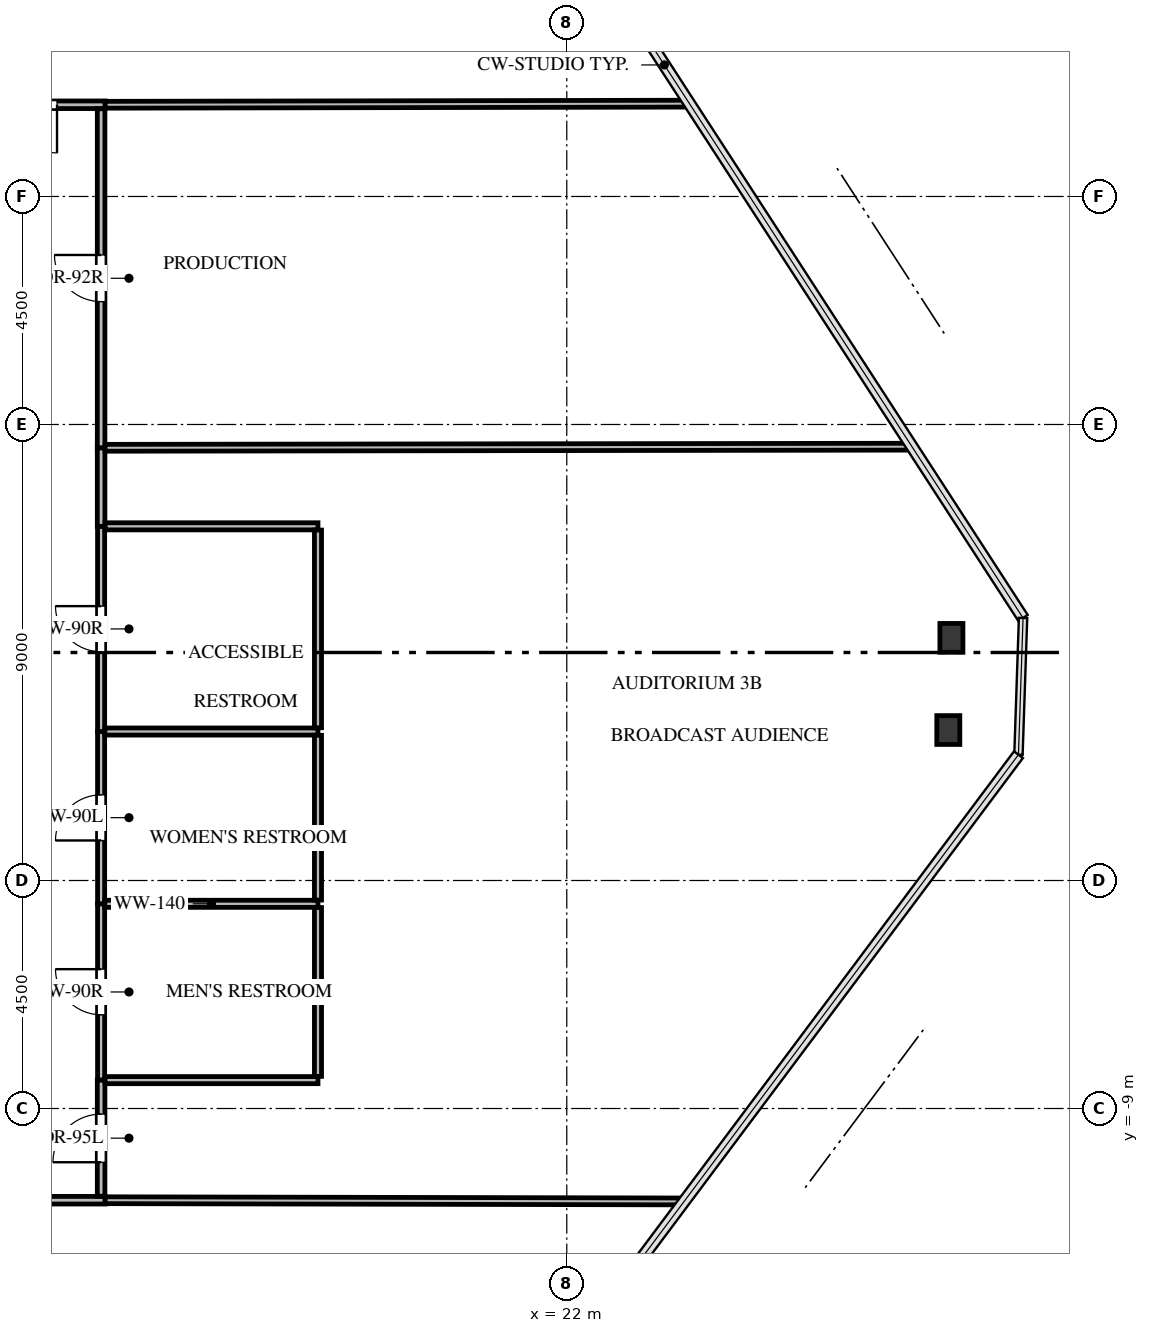
"""IFC4 building model, lengths in metres.
Left out: names, types, materials, properties, quantities, classifications, styles, units other than length and angle.
Written with IfcOpenShell. Run it as: python <this file> out.ifc"""

import sys

from ifc_helpers import new_model, si_unit, direction, frame, frame_2d, origin, origin_2d, place, context, subcontext, project, spatial, rectangle, i_section, extrude, source, transform, mapped, element, fill, save


model = new_model("IFC4")
c1 = context("Model", 3, precision=1e-05, world=origin(), true_north=direction((0.0, 1.0)))
c2 = subcontext(c1, "Body", "Model", "MODEL_VIEW")
j1 = project(units=[si_unit("LENGTHUNIT", "METRE"), si_unit("PLANEANGLEUNIT", "RADIAN")], contexts=[c1])
p1 = place(None, origin())
s1 = spatial("IfcSite", under=j1, at=p1, CompositionType="ELEMENT")
p2 = place(p1, origin())
s2 = spatial("IfcBuilding", under=s1, at=p2, CompositionType="ELEMENT")
p3 = place(p2, frame((0.0, 0.0, 15.6)))
s3 = spatial("IfcBuildingStorey", under=s2, at=p3, CompositionType="ELEMENT", Elevation=15.6)
m1 = source(origin(), c2, "Body", "SweptSolid", [
    extrude(i_section(OverallWidth=0.454, OverallDepth=0.569, WebThickness=0.078, FlangeThickness=0.125, FilletRadius=0.031, at=origin_2d()), origin(), (0.0, 0.0, 1.0), 5.6),
])
for number, where, z_axis, x_axis in (
    (1, (29.591, 0.289, -0.32), (0.0, 0.0, 1.0), (1.0, 0.0, 0.0)),
    (2, (29.529, -1.531, -0.32), (0.0, 0.0, 1.0), (1.0, 0.0, 0.0)),
):
    element("IfcColumn", number, at=place(p3, frame(where, z_axis=z_axis, x_axis=x_axis)), inside=s3, PredefinedType="COLUMN", context=c2, shape_type="MappedRepresentation", body=[
        mapped(m1, transform((0.0, 0.0, 0.0), x_axis=(1.0, 0.0, 0.0), y_axis=(0.0, 1.0, 0.0), z_axis=(0.0, 0.0, 1.0), scale=1.0)),
    ])
p4 = place(p3, frame((12.81, -8.44, 0.0), z_axis=(0.0, 0.0, 1.0), x_axis=(0.0, 1.0, 0.0)))
e3 = element("IfcWall", 3, at=p4, inside=s3, PredefinedType="PARTITIONING", context=c2, shape_type="SweptSolid", body=[
    extrude(rectangle(XDim=3.48, YDim=0.14, at=frame_2d((1.74, 0.0))), origin(), (0.0, 0.0, 1.0), 5.265),
])
p5 = place(p4, frame((1.29, 0.0, 0.0)))
e4 = element("IfcOpeningElement", 4, at=p5, cuts=e3, PredefinedType="OPENING", context=c2, shape_type="SweptSolid", body=[
    extrude(rectangle(XDim=0.9, YDim=2.05, at=frame_2d((0.45, 1.025))), frame((0.0, 0.08, 0.0), z_axis=(0.0, -1.0, 0.0), x_axis=(1.0, 0.0, 0.0)), (0.0, 0.0, 1.0), 0.16),
])
p6 = place(p3, frame((12.81, -4.96, 0.0), z_axis=(0.0, 0.0, 1.0), x_axis=(0.0, 1.0, 0.0)))
e5 = element("IfcWall", 5, at=p6, inside=s3, PredefinedType="PARTITIONING", context=c2, shape_type="SweptSolid", body=[
    extrude(rectangle(XDim=3.4, YDim=0.14, at=frame_2d((1.7, 0.0))), origin(), (0.0, 0.0, 1.0), 4.284),
])
p7 = place(p6, frame((1.25, 0.0, 0.0)))
e6 = element("IfcOpeningElement", 6, at=p7, cuts=e5, PredefinedType="OPENING", context=c2, shape_type="SweptSolid", body=[
    extrude(rectangle(XDim=0.9, YDim=2.05, at=frame_2d((0.45, 1.025))), frame((0.0, 0.08, 0.0), z_axis=(0.0, -1.0, 0.0), x_axis=(1.0, 0.0, 0.0)), (0.0, 0.0, 1.0), 0.16),
])
p8 = place(p3, frame((12.81, -1.56, 0.0), z_axis=(0.0, 0.0, 1.0), x_axis=(0.0, 1.0, 0.0)))
e7 = element("IfcWall", 7, at=p8, inside=s3, PredefinedType="PARTITIONING", context=c2, shape_type="SweptSolid", body=[
    extrude(rectangle(XDim=4.05, YDim=0.14, at=frame_2d((2.025, 0.0))), origin(), (0.0, 0.0, 1.0), 4.284),
])
p9 = place(p8, frame((1.575, 0.0, 0.0)))
e8 = element("IfcOpeningElement", 8, at=p9, cuts=e7, PredefinedType="OPENING", context=c2, shape_type="SweptSolid", body=[
    extrude(rectangle(XDim=0.9, YDim=2.05, at=frame_2d((0.45, 1.025))), frame((0.0, 0.08, 0.0), z_axis=(0.0, -1.0, 0.0), x_axis=(1.0, 0.0, 0.0)), (0.0, 0.0, 1.0), 0.16),
])
p10 = place(p3, frame((12.89, 10.81, 0.0), z_axis=(0.0, 0.0, 1.0), x_axis=(-1.0, 0.0, 0.0)))
e9 = element("IfcWall", 9, at=p10, inside=s3, PredefinedType="PARTITIONING", context=c2, shape_type="SweptSolid", body=[
    extrude(rectangle(XDim=2.85, YDim=0.15, at=frame_2d((1.425, 0.0))), origin(), (0.0, 0.0, 1.0), 4.284),
])
p11 = place(p10, frame((0.95, 0.0, 0.0)))
e10 = element("IfcOpeningElement", 10, at=p11, cuts=e9, PredefinedType="OPENING", context=c2, shape_type="SweptSolid", body=[
    extrude(rectangle(XDim=0.95, YDim=2.1, at=frame_2d((0.475, 1.05))), frame((0.0, 0.085, 0.0), z_axis=(0.0, -1.0, 0.0), x_axis=(1.0, 0.0, 0.0)), (0.0, 0.0, 1.0), 0.17),
])
p12 = place(p3, frame((6.04, -10.81, 0.0), z_axis=(0.0, 0.0, 1.0), x_axis=(1.0, 0.0, 0.0)))
e11 = element("IfcWall", 11, at=p12, inside=s3, PredefinedType="PARTITIONING", context=c2, shape_type="SweptSolid", body=[
    extrude(rectangle(XDim=6.85, YDim=0.15, at=frame_2d((3.425, 0.0))), origin(), (0.0, 0.0, 1.0), 5.265),
])
p13 = place(p12, frame((0.35, 0.0, 0.0)))
e12 = element("IfcOpeningElement", 12, at=p13, cuts=e11, PredefinedType="OPENING", context=c2, shape_type="SweptSolid", body=[
    extrude(rectangle(XDim=0.92, YDim=2.1, at=frame_2d((0.46, 1.05))), frame((0.0, 0.085, 0.0), z_axis=(0.0, -1.0, 0.0), x_axis=(1.0, 0.0, 0.0)), (0.0, 0.0, 1.0), 0.17),
])
p14 = place(p3, frame((12.81, -10.731, 0.0), z_axis=(0.0, 0.0, 1.0), x_axis=(0.0, 1.0, 0.0)))
e13 = element("IfcWall", 13, at=p14, inside=s3, PredefinedType="PARTITIONING", context=c2, shape_type="SweptSolid", body=[
    extrude(rectangle(XDim=2.291, YDim=0.15, at=frame_2d((1.146, 0.0))), origin(), (0.0, 0.0, 1.0), 5.265),
])
p15 = place(p14, frame((0.67, 0.0, 0.0)))
e14 = element("IfcOpeningElement", 14, at=p15, cuts=e13, PredefinedType="OPENING", context=c2, shape_type="SweptSolid", body=[
    extrude(rectangle(XDim=0.95, YDim=2.1, at=frame_2d((0.475, 1.05))), frame((0.0, 0.085, 0.0), z_axis=(0.0, -1.0, 0.0), x_axis=(1.0, 0.0, 0.0)), (0.0, 0.0, 1.0), 0.17),
])
p16 = place(p3, frame((12.81, 2.49, 0.0), z_axis=(0.0, 0.0, 1.0), x_axis=(0.0, 1.0, 0.0)))
e15 = element("IfcWall", 15, at=p16, inside=s3, PredefinedType="PARTITIONING", context=c2, shape_type="SweptSolid", body=[
    extrude(rectangle(XDim=1.55, YDim=0.15, at=frame_2d((0.775, 0.0))), origin(), (0.0, 0.0, 1.0), 5.265),
])
p17 = place(p3, frame((12.81, 4.04, 0.0), z_axis=(0.0, 0.0, 1.0), x_axis=(0.0, 1.0, 0.0)))
e16 = element("IfcWall", 16, at=p17, inside=s3, PredefinedType="PARTITIONING", context=c2, shape_type="SweptSolid", body=[
    extrude(rectangle(XDim=6.691, YDim=0.15, at=frame_2d((3.345, 0.0))), origin(), (0.0, 0.0, 1.0), 5.265),
])
p18 = place(p17, frame((2.885, 0.0, 0.0)))
e17 = element("IfcOpeningElement", 17, at=p18, cuts=e16, PredefinedType="OPENING", context=c2, shape_type="SweptSolid", body=[
    extrude(rectangle(XDim=0.92, YDim=2.1, at=frame_2d((0.46, 1.05))), frame((0.0, 0.085, 0.0), z_axis=(0.0, -1.0, 0.0), x_axis=(1.0, 0.0, 0.0)), (0.0, 0.0, 1.0), 0.17),
])
p19 = place(p3, frame((12.884, -4.96, 0.0), z_axis=(0.0, 0.0, 1.0), x_axis=(1.0, 0.0, 0.0)))
e18 = element("IfcWall", 18, at=p19, inside=s3, PredefinedType="PARTITIONING", context=c2, shape_type="SweptSolid", body=[
    extrude(rectangle(XDim=4.206, YDim=0.14, at=frame_2d((2.103, 0.0))), origin(), (0.0, 0.0, 1.0), 5.265),
])
p20 = place(p3, frame((17.09, -8.44, 0.0), z_axis=(0.0, 0.0, 1.0), x_axis=(-1.0, 0.0, 0.0)))
e19 = element("IfcWall", 19, at=p20, inside=s3, PredefinedType="PARTITIONING", context=c2, shape_type="SweptSolid", body=[
    extrude(rectangle(XDim=4.201, YDim=0.14, at=frame_2d((2.101, 0.0))), origin(), (0.0, 0.0, 1.0), 5.265),
])
p21 = place(p3, frame((17.09, -5.034, 0.0), z_axis=(0.0, 0.0, 1.0), x_axis=(0.0, -1.0, 0.0)))
e20 = element("IfcWall", 20, at=p21, inside=s3, PredefinedType="PARTITIONING", context=c2, shape_type="SweptSolid", body=[
    extrude(rectangle(XDim=3.332, YDim=0.14, at=frame_2d((1.666, 0.0))), origin(), (0.0, 0.0, 1.0), 5.265),
])
p22 = place(p3, frame((12.884, -1.56, 0.0), z_axis=(0.0, 0.0, 1.0), x_axis=(1.0, 0.0, 0.0)))
e21 = element("IfcWall", 21, at=p22, inside=s3, PredefinedType="PARTITIONING", context=c2, shape_type="SweptSolid", body=[
    extrude(rectangle(XDim=4.206, YDim=0.14, at=frame_2d((2.103, 0.0))), origin(), (0.0, 0.0, 1.0), 5.265),
])
p23 = place(p3, frame((17.09, -1.634, 0.0), z_axis=(0.0, 0.0, 1.0), x_axis=(0.0, -1.0, 0.0)))
e22 = element("IfcWall", 22, at=p23, inside=s3, PredefinedType="PARTITIONING", context=c2, shape_type="SweptSolid", body=[
    extrude(rectangle(XDim=3.252, YDim=0.14, at=frame_2d((1.626, 0.0))), origin(), (0.0, 0.0, 1.0), 4.284),
])
p24 = place(p3, frame((12.889, 2.49, 0.0), z_axis=(0.0, 0.0, 1.0), x_axis=(1.0, 0.0, 0.0)))
e23 = element("IfcWall", 23, at=p24, inside=s3, PredefinedType="PARTITIONING", context=c2, shape_type="SweptSolid", body=[
    extrude(rectangle(XDim=4.201, YDim=0.14, at=frame_2d((2.101, 0.0))), origin(), (0.0, 0.0, 1.0), 5.265),
])
p25 = place(p3, frame((17.09, 2.416, 0.0), z_axis=(0.0, 0.0, 1.0), x_axis=(0.0, -1.0, 0.0)))
e24 = element("IfcWall", 24, at=p25, inside=s3, PredefinedType="PARTITIONING", context=c2, shape_type="SweptSolid", body=[
    extrude(rectangle(XDim=3.902, YDim=0.14, at=frame_2d((1.951, 0.0))), origin(), (0.0, 0.0, 1.0), 4.284),
])
p26 = place(p3, frame((24.422, 10.832, 0.0), z_axis=(0.0, 0.0, 1.0), x_axis=(-0.999998264499, -0.001863061508, 0.0)))
e25 = element("IfcWall", 25, at=p26, inside=s3, PredefinedType="PARTITIONING", context=c2, shape_type="SweptSolid", body=[
    extrude(rectangle(XDim=11.532, YDim=0.135, at=frame_2d((5.766, 0.0))), origin(), (0.0, 0.0, 1.0), 4.574),
])
p27 = place(p3, frame((12.89, -10.81, 0.0), z_axis=(0.0, 0.0, 1.0), x_axis=(0.999997852069, -0.002072645121, 0.0)))
e26 = element("IfcWall", 26, at=p27, inside=s3, PredefinedType="PARTITIONING", context=c2, shape_type="SweptSolid", body=[
    extrude(rectangle(XDim=11.426, YDim=0.135, at=frame_2d((5.713, 0.0))), origin(), (0.0, 0.0, 1.0), 4.574),
])
p28 = place(p3, frame((12.889, 4.04, 0.0), z_axis=(0.0, 0.0, 1.0), x_axis=(0.999999068975, 0.001364568967, 0.0)))
e27 = element("IfcWall", 27, at=p28, inside=s3, PredefinedType="PARTITIONING", context=c2, shape_type="SweptSolid", body=[
    extrude(rectangle(XDim=15.923, YDim=0.135, at=frame_2d((7.962, 0.0))), origin(), (0.0, 0.0, 1.0), 4.574),
])
m2 = source(origin(), c2, "Body", "SweptSolid", [
    extrude(rectangle(XDim=0.9, YDim=2.05, at=frame_2d((0.45, 1.025))), frame((0.0, 0.025, 0.0), z_axis=(0.0, -1.0, 0.0), x_axis=(1.0, 0.0, 0.0)), (0.0, 0.0, 1.0), 0.05),
])
p29 = place(p5, origin())
e28 = element("IfcDoor", 28, at=p29, inside=s3, OperationType="SINGLE_SWING_RIGHT", PredefinedType="DOOR", context=c2, shape_type="MappedRepresentation", body=[
    mapped(m2, transform((0.0, 0.0, 0.0), x_axis=(1.0, 0.0, 0.0), y_axis=(0.0, 1.0, 0.0), z_axis=(0.0, 0.0, 1.0), scale=1.0)),
])
fill(e4, e28)
m3 = source(origin(), c2, "Body", "SweptSolid", [
    extrude(rectangle(XDim=0.9, YDim=2.05, at=frame_2d((0.45, 1.025))), frame((0.0, 0.025, 0.0), z_axis=(0.0, -1.0, 0.0), x_axis=(1.0, 0.0, 0.0)), (0.0, 0.0, 1.0), 0.05),
])
p30 = place(p7, origin())
e29 = element("IfcDoor", 29, at=p30, inside=s3, OperationType="SINGLE_SWING_LEFT", PredefinedType="DOOR", context=c2, shape_type="MappedRepresentation", body=[
    mapped(m3, transform((0.0, 0.0, 0.0), x_axis=(1.0, 0.0, 0.0), y_axis=(0.0, 1.0, 0.0), z_axis=(0.0, 0.0, 1.0), scale=1.0)),
])
fill(e6, e29)
p31 = place(p9, origin())
e30 = element("IfcDoor", 30, at=p31, inside=s3, OperationType="SINGLE_SWING_RIGHT", PredefinedType="DOOR", context=c2, shape_type="MappedRepresentation", body=[
    mapped(m2, transform((0.0, 0.0, 0.0), x_axis=(1.0, 0.0, 0.0), y_axis=(0.0, 1.0, 0.0), z_axis=(0.0, 0.0, 1.0), scale=1.0)),
])
fill(e8, e30)
m4 = source(origin(), c2, "Body", "SweptSolid", [
    extrude(rectangle(XDim=0.95, YDim=2.1, at=frame_2d((0.475, 1.05))), frame((0.0, 0.025, 0.0), z_axis=(0.0, -1.0, 0.0), x_axis=(1.0, 0.0, 0.0)), (0.0, 0.0, 1.0), 0.05),
])
p32 = place(p11, origin())
e31 = element("IfcDoor", 31, at=p32, inside=s3, OperationType="SINGLE_SWING_LEFT", PredefinedType="DOOR", context=c2, shape_type="MappedRepresentation", body=[
    mapped(m4, transform((0.0, 0.0, 0.0), x_axis=(1.0, 0.0, 0.0), y_axis=(0.0, 1.0, 0.0), z_axis=(0.0, 0.0, 1.0), scale=1.0)),
])
fill(e10, e31)
p33 = place(p15, origin())
e32 = element("IfcDoor", 32, at=p33, inside=s3, OperationType="SINGLE_SWING_LEFT", PredefinedType="DOOR", context=c2, shape_type="MappedRepresentation", body=[
    mapped(m4, transform((0.0, 0.0, 0.0), x_axis=(1.0, 0.0, 0.0), y_axis=(0.0, 1.0, 0.0), z_axis=(0.0, 0.0, 1.0), scale=1.0)),
])
fill(e14, e32)
m5 = source(origin(), c2, "Body", "SweptSolid", [
    extrude(rectangle(XDim=0.92, YDim=2.1, at=frame_2d((0.46, 1.05))), frame((0.0, 0.025, 0.0), z_axis=(0.0, -1.0, 0.0), x_axis=(1.0, 0.0, 0.0)), (0.0, 0.0, 1.0), 0.05),
])
p34 = place(p18, origin())
e33 = element("IfcDoor", 33, at=p34, inside=s3, OperationType="SINGLE_SWING_RIGHT", PredefinedType="DOOR", context=c2, shape_type="MappedRepresentation", body=[
    mapped(m5, transform((0.0, 0.0, 0.0), x_axis=(1.0, 0.0, 0.0), y_axis=(0.0, 1.0, 0.0), z_axis=(0.0, 0.0, 1.0), scale=1.0)),
])
fill(e17, e33)
save(model, sys.argv[1])
